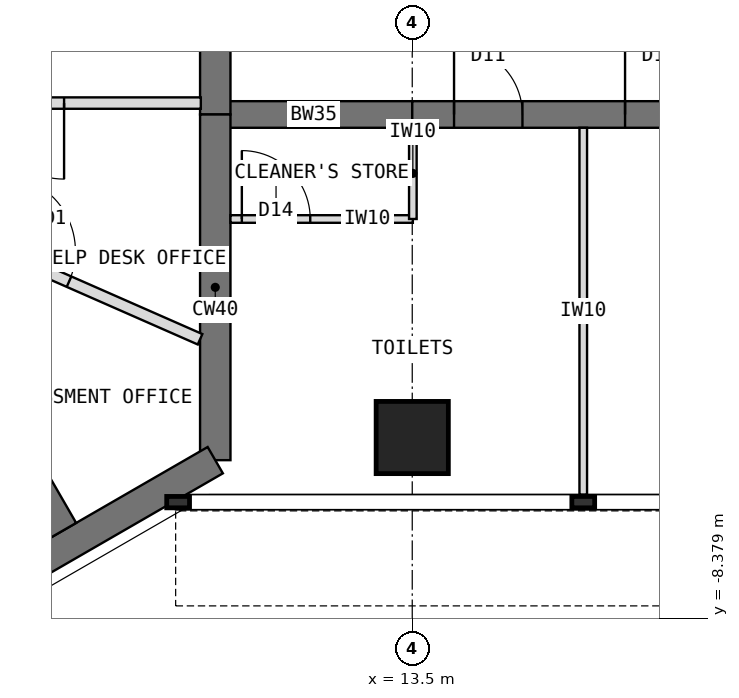
"""IFC4 building model, lengths in metres.
Left out: names, types, materials, properties, quantities, classifications, styles, units other than length and angle.
Written with IfcOpenShell. Run it as: python <this file> out.ifc"""

import sys

from ifc_helpers import new_model, si_unit, direction, frame, frame_2d, origin, origin_2d, place, context, subcontext, project, spatial, rectangle, extrude, element, fill, save


model = new_model("IFC4")
c1 = context("Model", 3, precision=1e-05, world=origin(), true_north=direction((0.0, 1.0)))
c2 = subcontext(c1, "Body", "Model", "MODEL_VIEW")
j1 = project(units=[si_unit("LENGTHUNIT", "METRE"), si_unit("PLANEANGLEUNIT", "RADIAN")], contexts=[c1])
p1 = place(None, origin())
s1 = spatial("IfcSite", under=j1, at=p1, CompositionType="ELEMENT")
p2 = place(p1, origin())
s2 = spatial("IfcBuilding", under=s1, at=p2, CompositionType="ELEMENT")
p3 = place(p2, frame((0.0, 0.0, 267.5)))
s3 = spatial("IfcBuildingStorey", under=s2, at=p3, CompositionType="ELEMENT", Elevation=267.5)
p4 = place(p3, frame((10.908, -6.298, 0.0), z_axis=(0.0, 0.0, 1.0), x_axis=(0.0, 1.0, 0.0)))
e1 = element("IfcWall", 1, at=p4, inside=s3, PredefinedType="SHEAR", context=c2, shape_type="SweptSolid", body=[
    extrude(rectangle(XDim=4.548, YDim=0.4, at=frame_2d((2.274, 0.0))), origin(), (0.0, 0.0, 1.0), 4.0),
])
p5 = place(p3, frame((10.908, -1.75, 0.0), z_axis=(0.0, 0.0, 1.0), x_axis=(0.0, 1.0, 0.0)))
e2 = element("IfcWall", 2, at=p5, inside=s3, PredefinedType="SHEAR", context=c2, shape_type="SweptSolid", body=[
    extrude(rectangle(XDim=3.5, YDim=0.4, at=frame_2d((1.75, 0.0))), origin(), (0.0, 0.0, 1.0), 4.0),
])
p6 = place(p5, frame((0.85, 0.0, 0.0)))
e3 = element("IfcOpeningElement", 3, at=p6, cuts=e2, PredefinedType="OPENING", context=c2, shape_type="SweptSolid", body=[
    extrude(rectangle(XDim=1.8, YDim=2.1, at=frame_2d((0.9, 1.05))), frame((0.0, 0.21, 0.0), z_axis=(0.0, -1.0, 0.0), x_axis=(1.0, 0.0, 0.0)), (0.0, 0.0, 1.0), 0.42),
])
p7 = place(p3, frame((0.0, -12.596, 0.0), z_axis=(0.0, 0.0, 1.0), x_axis=(0.866021940709, 0.500005998175, 0.0)))
e4 = element("IfcWall", 4, at=p7, inside=s3, PredefinedType="SHEAR", context=c2, shape_type="SweptSolid", body=[
    extrude(rectangle(XDim=12.596, YDim=0.4, at=frame_2d((6.298, 0.0))), origin(), (0.0, 0.0, 1.0), 4.0),
])
p8 = place(p3, frame((10.908, -1.75, 0.0), z_axis=(0.0, 0.0, 1.0), x_axis=(1.0, 0.0, 0.0)))
e5 = element("IfcWall", 5, at=p8, inside=s3, PredefinedType="SHEAR", context=c2, shape_type="SweptSolid", body=[
    extrude(rectangle(XDim=2.592, YDim=0.35, at=frame_2d((1.296, 0.0))), origin(), (0.0, 0.0, 1.0), 4.0),
])
p9 = place(p3, frame((13.5, -1.75, 0.0), z_axis=(0.0, 0.0, 1.0), x_axis=(1.0, 0.0, 0.0)))
e6 = element("IfcWall", 6, at=p9, inside=s3, PredefinedType="SHEAR", context=c2, shape_type="SweptSolid", body=[
    extrude(rectangle(XDim=13.2, YDim=0.35, at=frame_2d((6.6, 0.0))), origin(), (0.0, 0.0, 1.0), 4.0),
])
p10 = place(p9, frame((0.55, 0.0, 0.0)))
e7 = element("IfcOpeningElement", 7, at=p10, cuts=e6, PredefinedType="OPENING", context=c2, shape_type="SweptSolid", body=[
    extrude(rectangle(XDim=0.9, YDim=2.1, at=frame_2d((0.45, 1.05))), frame((0.0, 0.185, 0.0), z_axis=(0.0, -1.0, 0.0), x_axis=(1.0, 0.0, 0.0)), (0.0, 0.0, 1.0), 0.37),
])
p11 = place(p9, frame((2.8, 0.0, 0.0)))
e8 = element("IfcOpeningElement", 8, at=p11, cuts=e6, PredefinedType="OPENING", context=c2, shape_type="SweptSolid", body=[
    extrude(rectangle(XDim=0.9, YDim=2.1, at=frame_2d((0.45, 1.05))), frame((0.0, 0.185, 0.0), z_axis=(0.0, -1.0, 0.0), x_axis=(1.0, 0.0, 0.0)), (0.0, 0.0, 1.0), 0.37),
])
p12 = place(p9, frame((7.3, 0.0, 0.0)))
e9 = element("IfcOpeningElement", 9, at=p12, cuts=e6, PredefinedType="OPENING", context=c2, shape_type="SweptSolid", body=[
    extrude(rectangle(XDim=0.9, YDim=2.1, at=frame_2d((0.45, 1.05))), frame((0.0, 0.185, 0.0), z_axis=(0.0, -1.0, 0.0), x_axis=(1.0, 0.0, 0.0)), (0.0, 0.0, 1.0), 0.37),
])
p13 = place(p3, frame((13.5, -6.0, 0.0), z_axis=(0.0, 0.0, 1.0), x_axis=(1.0, 0.0, 0.0)))
e10 = element("IfcColumn", 10, at=p13, inside=s3, PredefinedType="COLUMN", context=c2, shape_type="SweptSolid", body=[
    extrude(rectangle(XDim=0.95, YDim=0.95, at=origin_2d()), origin(), (0.0, 0.0, 1.0), 4.0),
])
p14 = place(p3, frame((5.901, -2.02, 0.0), z_axis=(0.0, 0.0, 1.0), x_axis=(0.499997979876, -0.866026570101, 0.0)))
e11 = element("IfcWall", 11, at=p14, inside=s3, PredefinedType="SHEAR", context=c2, shape_type="SweptSolid", body=[
    extrude(rectangle(XDim=6.008, YDim=0.4, at=frame_2d((3.004, 0.0))), origin(), (0.0, 0.0, 1.0), 4.0),
])
p15 = place(p3, frame((15.75, -1.925, 0.0), z_axis=(0.0, 0.0, 1.0), x_axis=(0.0, -1.0, 0.0)))
e12 = element("IfcWall", 12, at=p15, inside=s3, PredefinedType="PARTITIONING", context=c2, shape_type="SweptSolid", body=[
    extrude(rectangle(XDim=4.825, YDim=0.1, at=frame_2d((2.413, 0.0))), origin(), (0.0, 0.0, 1.0), 3.8),
])
p16 = place(p3, frame((11.108, -3.125, 0.0), z_axis=(0.0, 0.0, 1.0), x_axis=(1.0, 0.0, 0.0)))
e13 = element("IfcWall", 13, at=p16, inside=s3, PredefinedType="PARTITIONING", context=c2, shape_type="SweptSolid", body=[
    extrude(rectangle(XDim=2.4, YDim=0.1, at=frame_2d((1.2, 0.0))), origin(), (0.0, 0.0, 1.0), 3.8),
])
p17 = place(p16, frame((0.15, 0.0, 0.0)))
e14 = element("IfcOpeningElement", 14, at=p17, cuts=e13, PredefinedType="OPENING", context=c2, shape_type="SweptSolid", body=[
    extrude(rectangle(XDim=0.9, YDim=2.1, at=frame_2d((0.45, 1.05))), frame((0.0, 0.06, 0.0), z_axis=(0.0, -1.0, 0.0), x_axis=(1.0, 0.0, 0.0)), (0.0, 0.0, 1.0), 0.12),
])
p18 = place(p3, frame((13.508, -1.925, 0.0), z_axis=(0.0, 0.0, 1.0), x_axis=(0.0, -1.0, 0.0)))
e15 = element("IfcWall", 15, at=p18, inside=s3, PredefinedType="PARTITIONING", context=c2, shape_type="SweptSolid", body=[
    extrude(rectangle(XDim=1.2, YDim=0.1, at=frame_2d((0.6, 0.0))), origin(), (0.0, 0.0, 1.0), 3.267),
])
p19 = place(p3, frame((10.718, -1.6, 0.0), z_axis=(0.0, 0.0, 1.0), x_axis=(-1.0, 0.0, 0.0)))
e16 = element("IfcWall", 16, at=p19, inside=s3, PredefinedType="PARTITIONING", context=c2, shape_type="SweptSolid", body=[
    extrude(rectangle(XDim=4.618, YDim=0.15, at=frame_2d((2.309, 0.0))), origin(), (0.0, 0.0, 1.0), 3.8),
])
p20 = place(p19, frame((1.799, 0.0, 0.0)))
e17 = element("IfcOpeningElement", 17, at=p20, cuts=e16, PredefinedType="OPENING", context=c2, shape_type="SweptSolid", body=[
    extrude(rectangle(XDim=1.0, YDim=2.1, at=frame_2d((0.5, 1.05))), frame((0.0, 0.085, 0.0), z_axis=(0.0, -1.0, 0.0), x_axis=(1.0, 0.0, 0.0)), (0.0, 0.0, 1.0), 0.17),
])
p21 = place(p3, frame((6.344, -2.789, 0.0), z_axis=(0.0, 0.0, 1.0), x_axis=(0.915438841787, -0.402457111937, 0.0)))
e18 = element("IfcWall", 18, at=p21, inside=s3, PredefinedType="PARTITIONING", context=c2, shape_type="SweptSolid", body=[
    extrude(rectangle(XDim=4.767, YDim=0.15, at=frame_2d((2.383, 0.0))), origin(), (0.0, 0.0, 1.0), 3.8),
])
p22 = place(p21, frame((1.883, 0.0, 0.0)))
e19 = element("IfcOpeningElement", 19, at=p22, cuts=e18, PredefinedType="OPENING", context=c2, shape_type="SweptSolid", body=[
    extrude(rectangle(XDim=1.0, YDim=2.1, at=frame_2d((0.5, 1.05))), frame((0.0, 0.085, 0.0), z_axis=(0.0, -1.0, 0.0), x_axis=(1.0, 0.0, 0.0)), (0.0, 0.0, 1.0), 0.17),
])
p23 = place(p17, origin())
e20 = element("IfcDoor", 20, at=p23, inside=s3, OperationType="SINGLE_SWING_LEFT", PredefinedType="DOOR", context=c2, shape_type="SweptSolid", body=[
    extrude(rectangle(XDim=0.9, YDim=2.1, at=frame_2d((0.45, 1.05))), frame((0.0, 0.025, 0.0), z_axis=(0.0, -1.0, 0.0), x_axis=(1.0, 0.0, 0.0)), (0.0, 0.0, 1.0), 0.05),
])
fill(e14, e20)
p24 = place(p20, origin())
e21 = element("IfcDoor", 21, at=p24, inside=s3, OperationType="SINGLE_SWING_LEFT", PredefinedType="DOOR", context=c2, shape_type="SweptSolid", body=[
    extrude(rectangle(XDim=1.0, YDim=2.1, at=frame_2d((0.5, 1.05))), frame((0.0, 0.025, 0.0), z_axis=(0.0, -1.0, 0.0), x_axis=(1.0, 0.0, 0.0)), (0.0, 0.0, 1.0), 0.05),
])
fill(e17, e21)
p25 = place(p22, origin())
e22 = element("IfcDoor", 22, at=p25, inside=s3, OperationType="SINGLE_SWING_LEFT", PredefinedType="DOOR", context=c2, shape_type="SweptSolid", body=[
    extrude(rectangle(XDim=1.0, YDim=2.1, at=frame_2d((0.5, 1.05))), frame((0.0, 0.025, 0.0), z_axis=(0.0, -1.0, 0.0), x_axis=(1.0, 0.0, 0.0)), (0.0, 0.0, 1.0), 0.05),
])
fill(e19, e22)
p26 = place(p10, origin())
e23 = element("IfcDoor", 23, at=p26, inside=s3, OperationType="SINGLE_SWING_LEFT", PredefinedType="DOOR", context=c2, shape_type="SweptSolid", body=[
    extrude(rectangle(XDim=0.9, YDim=2.1, at=frame_2d((0.45, 1.05))), frame((0.0, 0.025, 0.0), z_axis=(0.0, -1.0, 0.0), x_axis=(1.0, 0.0, 0.0)), (0.0, 0.0, 1.0), 0.05),
])
fill(e7, e23)
p27 = place(p11, origin())
e24 = element("IfcDoor", 24, at=p27, inside=s3, OperationType="SINGLE_SWING_LEFT", PredefinedType="DOOR", context=c2, shape_type="SweptSolid", body=[
    extrude(rectangle(XDim=0.9, YDim=2.1, at=frame_2d((0.45, 1.05))), frame((0.0, 0.025, 0.0), z_axis=(0.0, -1.0, 0.0), x_axis=(1.0, 0.0, 0.0)), (0.0, 0.0, 1.0), 0.05),
])
fill(e8, e24)
save(model, sys.argv[1])
